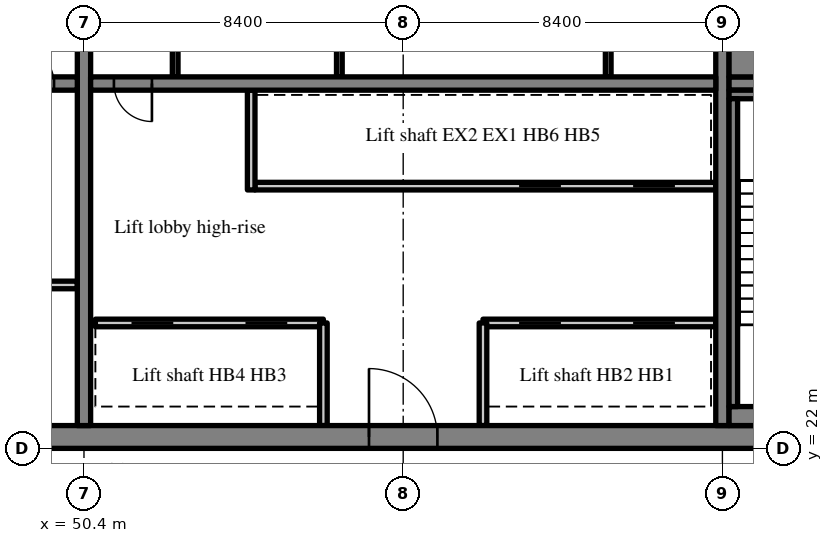
"""IFC4 building model, lengths in metres.
Left out: names, types, materials, properties, quantities, classifications, styles, units other than length and angle.
Written with IfcOpenShell. Run it as: python <this file> out.ifc"""

import sys

from ifc_helpers import new_model, si_unit, direction, frame, frame_2d, origin, place, context, subcontext, project, spatial, rectangle, extrude, source, transform, mapped, element, fill, save


model = new_model("IFC4")
c1 = context("Model", 3, precision=1e-05, world=origin(), true_north=direction((0.0, 1.0)))
c2 = subcontext(c1, "Body", "Model", "MODEL_VIEW")
j1 = project(units=[si_unit("LENGTHUNIT", "METRE"), si_unit("PLANEANGLEUNIT", "RADIAN")], contexts=[c1])
p1 = place(None, origin())
s1 = spatial("IfcSite", under=j1, at=p1, CompositionType="ELEMENT")
p2 = place(p1, origin())
s2 = spatial("IfcBuilding", under=s1, at=p2, CompositionType="ELEMENT")
p3 = place(p2, frame((0.0, 0.0, 217.9)))
s3 = spatial("IfcBuildingStorey", under=s2, at=p3, CompositionType="ELEMENT", Elevation=217.9)
m1 = source(origin(), c2, "Body", "SweptSolid", [
    extrude(rectangle(XDim=50.4, YDim=0.6, at=frame_2d((25.2, 0.0))), origin(), (0.0, 0.0, 1.0), 3.62),
])
p4 = place(p3, frame((25.2, 22.3, 0.0), z_axis=(0.0, 0.0, 1.0), x_axis=(1.0, 0.0, 0.0)))
e1 = element("IfcWall", 1, at=p4, inside=s3, PredefinedType="SHEAR", context=c2, shape_type="MappedRepresentation", body=[
    mapped(m1, transform((0.0, 0.0, 0.0), scale=1.0)),
])
m2 = source(origin(), c2, "Body", "SweptSolid", [
    extrude(rectangle(XDim=1.8, YDim=2.1, at=frame_2d((0.9, 1.05))), frame((0.0, 0.31, 0.0), z_axis=(0.0, -1.0, 0.0), x_axis=(1.0, 0.0, 0.0)), (0.0, 0.0, 1.0), 0.62),
])
p5 = place(p4, frame((15.9, 0.0, 0.0)))
e2 = element("IfcOpeningElement", 2, at=p5, cuts=e1, PredefinedType="OPENING", context=c2, shape_type="MappedRepresentation", body=[
    mapped(m2, transform((0.0, 0.0, 0.0), scale=1.0)),
])
m3 = source(origin(), c2, "Body", "SweptSolid", [
    extrude(rectangle(XDim=0.9, YDim=2.1, at=frame_2d((0.45, 1.05))), frame((0.0, 0.31, 0.0), z_axis=(0.0, -1.0, 0.0), x_axis=(1.0, 0.0, 0.0)), (0.0, 0.0, 1.0), 0.62),
])
p6 = place(p4, frame((9.687, 0.0, 0.0)))
e3 = element("IfcOpeningElement", 3, at=p6, cuts=e1, PredefinedType="OPENING", context=c2, shape_type="MappedRepresentation", body=[
    mapped(m3, transform((0.0, 0.0, 0.0), scale=1.0)),
])
p7 = place(p4, frame((21.513, 0.0, 0.0)))
e4 = element("IfcOpeningElement", 4, at=p7, cuts=e1, PredefinedType="OPENING", context=c2, shape_type="MappedRepresentation", body=[
    mapped(m3, transform((0.0, 0.0, 0.0), scale=1.0)),
])
p8 = place(p4, frame((32.7, 0.0, 0.0)))
e5 = element("IfcOpeningElement", 5, at=p8, cuts=e1, PredefinedType="OPENING", context=c2, shape_type="MappedRepresentation", body=[
    mapped(m2, transform((0.0, 0.0, 0.0), scale=1.0)),
])
m4 = source(origin(), c2, "Body", "SweptSolid", [
    extrude(rectangle(XDim=1.2, YDim=2.1, at=frame_2d((0.6, 1.05))), frame((0.0, 0.31, 0.0), z_axis=(0.0, -1.0, 0.0), x_axis=(1.0, 0.0, 0.0)), (0.0, 0.0, 1.0), 0.62),
])
p9 = place(p4, frame((6.488, 0.0, 0.0)))
e6 = element("IfcOpeningElement", 6, at=p9, cuts=e1, PredefinedType="OPENING", context=c2, shape_type="MappedRepresentation", body=[
    mapped(m4, transform((0.0, 0.0, 0.0), scale=1.0)),
])
p10 = place(p4, frame((47.925, 0.0, 0.0)))
e7 = element("IfcOpeningElement", 7, at=p10, cuts=e1, PredefinedType="OPENING", context=c2, shape_type="MappedRepresentation", body=[
    mapped(m4, transform((0.0, 0.0, 0.0), scale=1.0)),
])
m5 = source(origin(), c2, "Body", "SweptSolid", [
    extrude(rectangle(XDim=18.8, YDim=0.35, at=frame_2d((9.4, 0.0))), origin(), (0.0, 0.0, 1.0), 3.62),
])
p11 = place(p3, frame((50.4, 22.6, 0.0), z_axis=(0.0, 0.0, 1.0), x_axis=(0.0, 1.0, 0.0)))
e8 = element("IfcWall", 8, at=p11, inside=s3, PredefinedType="SHEAR", context=c2, shape_type="MappedRepresentation", body=[
    mapped(m5, transform((0.0, 0.0, 0.0), scale=1.0)),
])
m6 = source(origin(), c2, "Body", "SweptSolid", [
    extrude(rectangle(XDim=1.1, YDim=2.1, at=frame_2d((0.55, 1.05))), frame((0.0, 0.185, 0.0), z_axis=(0.0, -1.0, 0.0), x_axis=(1.0, 0.0, 0.0)), (0.0, 0.0, 1.0), 0.37),
])
p12 = place(p11, frame((12.85, 0.0, 0.0)))
e9 = element("IfcOpeningElement", 9, at=p12, cuts=e8, PredefinedType="OPENING", context=c2, shape_type="MappedRepresentation", body=[
    mapped(m6, transform((0.0, 0.0, 0.0), scale=1.0)),
])
p13 = place(p3, frame((67.2, 22.6, 0.0), z_axis=(0.0, 0.0, 1.0), x_axis=(0.0, 1.0, 0.0)))
e10 = element("IfcWall", 10, at=p13, inside=s3, PredefinedType="SHEAR", context=c2, shape_type="MappedRepresentation", body=[
    mapped(m5, transform((0.0, 0.0, 0.0), scale=1.0)),
])
m7 = source(origin(), c2, "Body", "SweptSolid", [
    extrude(rectangle(XDim=16.45, YDim=0.35, at=frame_2d((8.225, 0.0))), origin(), (0.0, 0.0, 1.0), 3.62),
])
p14 = place(p3, frame((33.775, 31.6, 0.0), z_axis=(0.0, 0.0, 1.0), x_axis=(1.0, 0.0, 0.0)))
e11 = element("IfcWall", 11, at=p14, inside=s3, PredefinedType="SHEAR", context=c2, shape_type="MappedRepresentation", body=[
    mapped(m7, transform((0.0, 0.0, 0.0), scale=1.0)),
])
m8 = source(origin(), c2, "Body", "SweptSolid", [
    extrude(rectangle(XDim=1.0, YDim=2.1, at=frame_2d((0.5, 1.05))), frame((0.0, 0.185, 0.0), z_axis=(0.0, -1.0, 0.0), x_axis=(1.0, 0.0, 0.0)), (0.0, 0.0, 1.0), 0.37),
])
p15 = place(p14, frame((14.837, 0.0, 0.0)))
e12 = element("IfcOpeningElement", 12, at=p15, cuts=e11, PredefinedType="OPENING", context=c2, shape_type="MappedRepresentation", body=[
    mapped(m8, transform((0.0, 0.0, 0.0), scale=1.0)),
])
m9 = source(origin(), c2, "Body", "SweptSolid", [
    extrude(rectangle(XDim=16.45, YDim=0.35, at=frame_2d((8.225, 0.0))), origin(), (0.0, 0.0, 1.0), 3.62),
])
p16 = place(p3, frame((50.575, 31.6, 0.0), z_axis=(0.0, 0.0, 1.0), x_axis=(1.0, 0.0, 0.0)))
e13 = element("IfcWall", 13, at=p16, inside=s3, PredefinedType="SHEAR", context=c2, shape_type="MappedRepresentation", body=[
    mapped(m9, transform((0.0, 0.0, 0.0), scale=1.0)),
])
p17 = place(p16, frame((0.613, 0.0, 0.0)))
e14 = element("IfcOpeningElement", 14, at=p17, cuts=e13, PredefinedType="OPENING", context=c2, shape_type="MappedRepresentation", body=[
    mapped(m8, transform((0.0, 0.0, 0.0), scale=1.0)),
])
m10 = source(origin(), c2, "Body", "SweptSolid", [
    extrude(rectangle(XDim=7.625, YDim=0.35, at=frame_2d((3.812, 0.0))), origin(), (0.0, 0.0, 1.0), 3.62),
])
p18 = place(p3, frame((67.375, 31.6, 0.0), z_axis=(0.0, 0.0, 1.0), x_axis=(1.0, 0.0, 0.0)))
e15 = element("IfcWall", 15, at=p18, inside=s3, PredefinedType="SHEAR", context=c2, shape_type="MappedRepresentation", body=[
    mapped(m10, transform((0.0, 0.0, 0.0), scale=1.0)),
])
p19 = place(p18, frame((5.8, 0.0, 0.0)))
e16 = element("IfcOpeningElement", 16, at=p19, cuts=e15, PredefinedType="OPENING", context=c2, shape_type="MappedRepresentation", body=[
    mapped(m6, transform((0.0, 0.0, 0.0), scale=1.0)),
])
m11 = source(origin(), c2, "Body", "SweptSolid", [
    extrude(rectangle(XDim=6.125, YDim=0.2, at=frame_2d((3.062, 0.0))), origin(), (0.0, 0.0, 1.0), 3.62),
])
p20 = place(p3, frame((44.1, 26.3, 0.0), z_axis=(0.0, 0.0, 1.0), x_axis=(1.0, 0.0, 0.0)))
e17 = element("IfcWall", 17, at=p20, inside=s3, PredefinedType="PARTITIONING", context=c2, shape_type="MappedRepresentation", body=[
    mapped(m11, transform((0.0, 0.0, 0.0), scale=1.0)),
])
p21 = place(p3, frame((67.025, 25.3, 0.0), z_axis=(0.0, 0.0, 1.0), x_axis=(-1.0, 0.0, 0.0)))
e18 = element("IfcWall", 18, at=p21, inside=s3, PredefinedType="SOLIDWALL", context=c2, shape_type="MappedRepresentation", body=[
    mapped(m11, transform((0.0, 0.0, 0.0), scale=1.0)),
])
m12 = source(origin(), c2, "Body", "SweptSolid", [
    extrude(rectangle(XDim=1.1, YDim=2.1, at=frame_2d((0.55, 1.05))), frame((0.0, 0.11, 0.0), z_axis=(0.0, -1.0, 0.0), x_axis=(1.0, 0.0, 0.0)), (0.0, 0.0, 1.0), 0.22),
])
p22 = place(p21, frame((1.075, 0.0, 0.0)))
e19 = element("IfcOpeningElement", 19, at=p22, cuts=e18, PredefinedType="OPENING", context=c2, shape_type="MappedRepresentation", body=[
    mapped(m12, transform((0.0, 0.0, 0.0), scale=1.0)),
])
p23 = place(p21, frame((4.075, 0.0, 0.0)))
e20 = element("IfcOpeningElement", 20, at=p23, cuts=e18, PredefinedType="OPENING", context=c2, shape_type="MappedRepresentation", body=[
    mapped(m12, transform((0.0, 0.0, 0.0), scale=1.0)),
])
m13 = source(origin(), c2, "Body", "SweptSolid", [
    extrude(rectangle(XDim=6.0, YDim=0.2, at=frame_2d((3.0, 0.0))), origin(), (0.0, 0.0, 1.0), 3.62),
])
p24 = place(p3, frame((56.7, 25.3, 0.0), z_axis=(0.0, 0.0, 1.0), x_axis=(-1.0, 0.0, 0.0)))
e21 = element("IfcWall", 21, at=p24, inside=s3, PredefinedType="SOLIDWALL", context=c2, shape_type="MappedRepresentation", body=[
    mapped(m13, transform((0.0, 0.0, 0.0), scale=1.0)),
])
p25 = place(p24, frame((0.95, 0.0, 0.0)))
e22 = element("IfcOpeningElement", 22, at=p25, cuts=e21, PredefinedType="OPENING", context=c2, shape_type="MappedRepresentation", body=[
    mapped(m12, transform((0.0, 0.0, 0.0), scale=1.0)),
])
p26 = place(p24, frame((3.95, 0.0, 0.0)))
e23 = element("IfcOpeningElement", 23, at=p26, cuts=e21, PredefinedType="OPENING", context=c2, shape_type="MappedRepresentation", body=[
    mapped(m12, transform((0.0, 0.0, 0.0), scale=1.0)),
])
m14 = source(origin(), c2, "Body", "SweptSolid", [
    extrude(rectangle(XDim=12.125, YDim=0.2, at=frame_2d((6.062, 0.0))), origin(), (0.0, 0.0, 1.0), 3.62),
])
p27 = place(p3, frame((67.025, 28.9, 0.0), z_axis=(0.0, 0.0, 1.0), x_axis=(-1.0, 0.0, 0.0)))
e24 = element("IfcWall", 24, at=p27, inside=s3, PredefinedType="SOLIDWALL", context=c2, shape_type="MappedRepresentation", body=[
    mapped(m14, transform((0.0, 0.0, 0.0), scale=1.0)),
])
p28 = place(p27, frame((1.075, 0.0, 0.0)))
e25 = element("IfcOpeningElement", 25, at=p28, cuts=e24, PredefinedType="OPENING", context=c2, shape_type="MappedRepresentation", body=[
    mapped(m12, transform((0.0, 0.0, 0.0), scale=1.0)),
])
p29 = place(p27, frame((4.075, 0.0, 0.0)))
e26 = element("IfcOpeningElement", 26, at=p29, cuts=e24, PredefinedType="OPENING", context=c2, shape_type="MappedRepresentation", body=[
    mapped(m12, transform((0.0, 0.0, 0.0), scale=1.0)),
])
m15 = source(origin(), c2, "Body", "SweptSolid", [
    extrude(rectangle(XDim=2.7, YDim=0.2, at=frame_2d((1.35, 0.0))), origin(), (0.0, 0.0, 1.0), 3.62),
])
for number, where, z_axis, x_axis in (
    (27, (60.9, 22.6, 0.0), (0.0, 0.0, 1.0), (0.0, 1.0, 0.0)),
    (28, (56.7, 22.6, 0.0), (0.0, 0.0, 1.0), (0.0, 1.0, 0.0)),
):
    element("IfcWall", number, at=place(p3, frame(where, z_axis=z_axis, x_axis=x_axis)), inside=s3, PredefinedType="SOLIDWALL", context=c2, shape_type="MappedRepresentation", body=[
        mapped(m15, transform((0.0, 0.0, 0.0), scale=1.0)),
    ])
m16 = source(origin(), c2, "Body", "SweptSolid", [
    extrude(rectangle(XDim=2.625, YDim=0.2, at=frame_2d((1.312, 0.0))), origin(), (0.0, 0.0, 1.0), 3.62),
])
p30 = place(p3, frame((54.8, 28.8, 0.0), z_axis=(0.0, 0.0, 1.0), x_axis=(0.0, 1.0, 0.0)))
e29 = element("IfcWall", 29, at=p30, inside=s3, PredefinedType="SOLIDWALL", context=c2, shape_type="MappedRepresentation", body=[
    mapped(m16, transform((0.0, 0.0, 0.0), scale=1.0)),
])
m17 = source(origin(), c2, "Body", "SweptSolid", [
    extrude(rectangle(XDim=3.225, YDim=0.15, at=frame_2d((1.613, 0.0))), origin(), (0.0, 0.0, 1.0), 3.62),
])
for number, where, z_axis, x_axis in (
    (30, (52.8, 31.775, 0.0), (0.0, 0.0, 1.0), (0.0, 1.0, 0.0)),
    (31, (64.195, 31.775, 0.0), (0.0, 0.0, 1.0), (0.0, 1.0, 0.0)),
    (32, (57.12, 31.775, 0.0), (0.0, 0.0, 1.0), (0.0, 1.0, 0.0)),
):
    element("IfcWall", number, at=place(p3, frame(where, z_axis=z_axis, x_axis=x_axis)), inside=s3, PredefinedType="PARTITIONING", context=c2, shape_type="MappedRepresentation", body=[
        mapped(m17, transform((0.0, 0.0, 0.0), scale=1.0)),
    ])
m18 = source(origin(), c2, "Body", "SweptSolid", [
    extrude(rectangle(XDim=4.875, YDim=0.5, at=frame_2d((2.438, 0.0))), origin(), (0.0, 0.0, 1.0), 3.62),
])
p31 = place(p3, frame((67.375, 22.85, 0.0), z_axis=(0.0, 0.0, 1.0), x_axis=(1.0, 0.0, 0.0)))
e33 = element("IfcWall", 33, at=p31, inside=s3, PredefinedType="SOLIDWALL", context=c2, shape_type="MappedRepresentation", body=[
    mapped(m18, transform((0.0, 0.0, 0.0), scale=1.0)),
])
m19 = source(origin(), c2, "Body", "SweptSolid", [
    extrude(rectangle(XDim=4.875, YDim=0.225, at=frame_2d((2.438, 0.0))), origin(), (0.0, 0.0, 1.0), 3.62),
])
p32 = place(p3, frame((67.375, 31.312, 0.0), z_axis=(0.0, 0.0, 1.0), x_axis=(1.0, 0.0, 0.0)))
e34 = element("IfcWall", 34, at=p32, inside=s3, PredefinedType="SOLIDWALL", context=c2, shape_type="MappedRepresentation", body=[
    mapped(m19, transform((0.0, 0.0, 0.0), scale=1.0)),
])
m20 = source(origin(), c2, "Body", "SweptSolid", [
    extrude(rectangle(XDim=8.1, YDim=0.225, at=frame_2d((4.05, 0.0))), origin(), (0.0, 0.0, 1.0), 3.62),
])
p33 = place(p3, frame((67.487, 23.1, 0.0), z_axis=(0.0, 0.0, 1.0), x_axis=(0.0, 1.0, 0.0)))
e35 = element("IfcWall", 35, at=p33, inside=s3, PredefinedType="SOLIDWALL", context=c2, shape_type="MappedRepresentation", body=[
    mapped(m20, transform((0.0, 0.0, 0.0), scale=1.0)),
])
m21 = source(origin(), c2, "Body", "SweptSolid", [
    extrude(rectangle(XDim=4.875, YDim=1.025, at=frame_2d((2.438, 0.0))), origin(), (0.0, 0.0, 1.0), 3.62),
])
p34 = place(p3, frame((67.375, 32.287, 0.0), z_axis=(0.0, 0.0, 1.0), x_axis=(1.0, 0.0, 0.0)))
e36 = element("IfcWall", 36, at=p34, inside=s3, PredefinedType="SOLIDWALL", context=c2, shape_type="MappedRepresentation", body=[
    mapped(m21, transform((0.0, 0.0, 0.0), scale=1.0)),
])
m22 = source(origin(), c2, "Body", "SweptSolid", [
    extrude(rectangle(XDim=1.0, YDim=2.1, at=frame_2d((0.5, 1.05))), frame((0.0, 0.025, 0.0), z_axis=(0.0, -1.0, 0.0), x_axis=(1.0, 0.0, 0.0)), (0.0, 0.0, 1.0), 0.05),
])
p35 = place(p15, origin())
e37 = element("IfcDoor", 37, at=p35, inside=s3, OperationType="SINGLE_SWING_LEFT", PredefinedType="DOOR", context=c2, shape_type="MappedRepresentation", body=[
    mapped(m22, transform((0.0, 0.0, 0.0), scale=1.0)),
])
fill(e12, e37)
m23 = source(origin(), c2, "Body", "SweptSolid", [
    extrude(rectangle(XDim=1.8, YDim=2.1, at=frame_2d((0.9, 1.05))), frame((0.0, 0.225, 0.0), z_axis=(0.0, -1.0, 0.0), x_axis=(1.0, 0.0, 0.0)), (0.0, 0.0, 1.0), 0.05),
])
p36 = place(p8, origin())
e38 = element("IfcDoor", 38, at=p36, inside=s3, OperationType="DOUBLE_DOOR_SINGLE_SWING", PredefinedType="DOOR", context=c2, shape_type="MappedRepresentation", body=[
    mapped(m23, transform((0.0, 0.0, 0.0), scale=1.0)),
])
fill(e5, e38)
p37 = place(p17, origin())
e39 = element("IfcDoor", 39, at=p37, inside=s3, OperationType="SINGLE_SWING_RIGHT", PredefinedType="DOOR", context=c2, shape_type="MappedRepresentation", body=[
    mapped(m22, transform((0.0, 0.0, 0.0), scale=1.0)),
])
fill(e14, e39)
m24 = source(origin(), c2, "Body", "SweptSolid", [
    extrude(rectangle(XDim=1.1, YDim=2.1, at=frame_2d((0.55, 1.05))), frame((0.0, 0.025, 0.0), z_axis=(0.0, -1.0, 0.0), x_axis=(1.0, 0.0, 0.0)), (0.0, 0.0, 1.0), 0.05),
])
p38 = place(p22, origin())
e40 = element("IfcDoor", 40, at=p38, inside=s3, OperationType="SLIDING_TO_RIGHT", PredefinedType="DOOR", context=c2, shape_type="MappedRepresentation", body=[
    mapped(m24, transform((0.0, 0.0, 0.0), scale=1.0)),
])
fill(e19, e40)
p39 = place(p23, origin())
e41 = element("IfcDoor", 41, at=p39, inside=s3, OperationType="SLIDING_TO_LEFT", PredefinedType="DOOR", context=c2, shape_type="MappedRepresentation", body=[
    mapped(m24, transform((0.0, 0.0, 0.0), scale=1.0)),
])
fill(e20, e41)
p40 = place(p25, origin())
e42 = element("IfcDoor", 42, at=p40, inside=s3, OperationType="SLIDING_TO_RIGHT", PredefinedType="DOOR", context=c2, shape_type="MappedRepresentation", body=[
    mapped(m24, transform((0.0, 0.0, 0.0), scale=1.0)),
])
fill(e22, e42)
p41 = place(p26, origin())
e43 = element("IfcDoor", 43, at=p41, inside=s3, OperationType="SLIDING_TO_LEFT", PredefinedType="DOOR", context=c2, shape_type="MappedRepresentation", body=[
    mapped(m24, transform((0.0, 0.0, 0.0), scale=1.0)),
])
fill(e23, e43)
p42 = place(p28, origin())
e44 = element("IfcDoor", 44, at=p42, inside=s3, OperationType="SLIDING_TO_RIGHT", PredefinedType="DOOR", context=c2, shape_type="MappedRepresentation", body=[
    mapped(m24, transform((0.0, 0.0, 0.0), scale=1.0)),
])
fill(e25, e44)
p43 = place(p29, origin())
e45 = element("IfcDoor", 45, at=p43, inside=s3, OperationType="SLIDING_TO_LEFT", PredefinedType="DOOR", context=c2, shape_type="MappedRepresentation", body=[
    mapped(m24, transform((0.0, 0.0, 0.0), scale=1.0)),
])
fill(e26, e45)
save(model, sys.argv[1])
